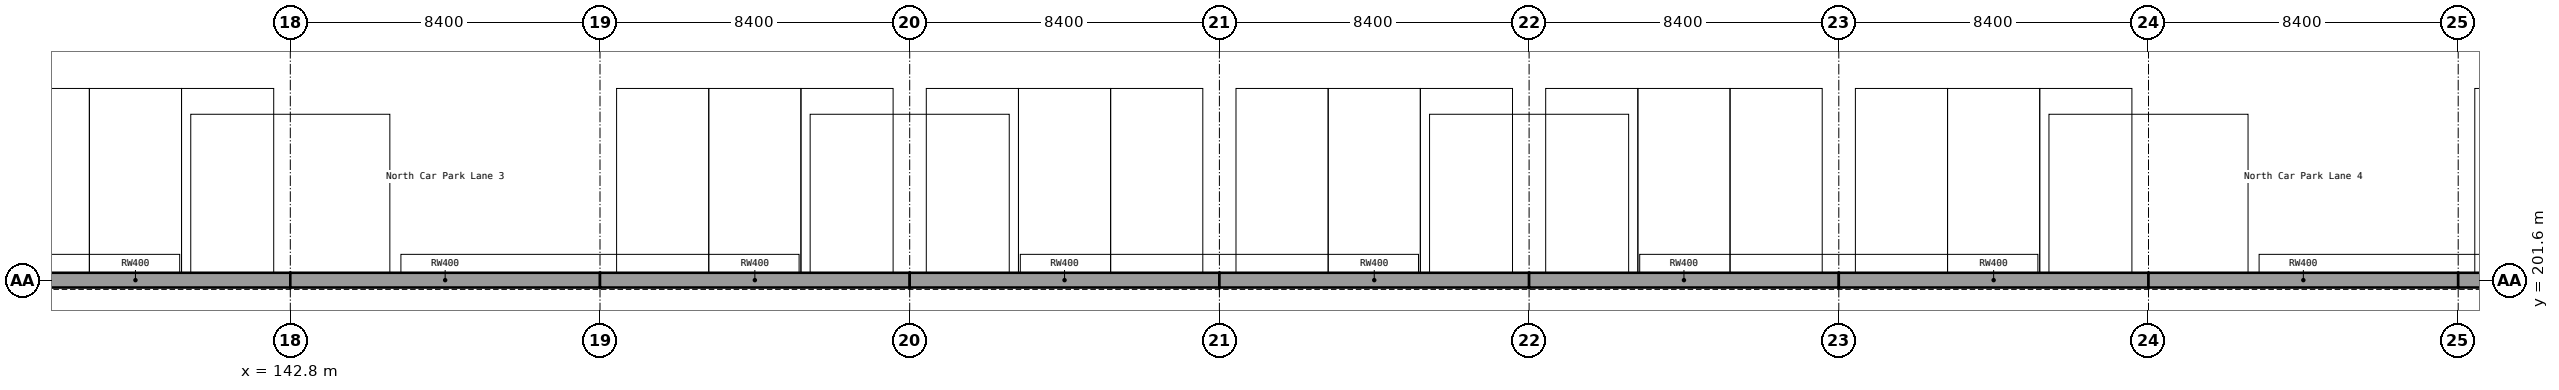
"""IFC4 building model, lengths in metres.
Left out: names, types, materials, properties, quantities, classifications, styles, units other than length and angle.
Written with IfcOpenShell. Run it as: python <this file> out.ifc"""

import sys

from ifc_helpers import new_model, si_unit, direction, frame, frame_2d, origin, place, context, subcontext, project, spatial, rectangle, extrude, element, save


model = new_model("IFC4")
c1 = context("Model", 3, precision=1e-05, world=origin(), true_north=direction((0.0, 1.0)))
c2 = subcontext(c1, "Body", "Model", "MODEL_VIEW")
j1 = project(units=[si_unit("LENGTHUNIT", "METRE"), si_unit("PLANEANGLEUNIT", "RADIAN")], contexts=[c1])
p1 = place(None, origin())
s1 = spatial("IfcSite", under=j1, at=p1, CompositionType="ELEMENT")
p2 = place(p1, origin())
s2 = spatial("IfcBuilding", under=s1, at=p2, CompositionType="ELEMENT")
p3 = place(p2, frame((0.0, 0.0, -3.0)))
s3 = spatial("IfcBuildingStorey", under=s2, at=p3, CompositionType="ELEMENT", Elevation=-3.0)
p4 = place(p3, frame((134.4, 201.6, 0.0), z_axis=(0.0, 0.0, 1.0), x_axis=(1.0, 0.0, 0.0)))
e1 = element("IfcWall", 1, at=p4, inside=s3, PredefinedType="SOLIDWALL", context=c2, shape_type="SweptSolid", body=[
    extrude(rectangle(XDim=8.4, YDim=0.4, at=frame_2d((4.2, 0.0))), origin(), (0.0, 0.0, 1.0), 3.0),
])
p5 = place(p3, frame((142.8, 201.6, 0.0), z_axis=(0.0, 0.0, 1.0), x_axis=(1.0, 0.0, 0.0)))
e2 = element("IfcWall", 2, at=p5, inside=s3, PredefinedType="SOLIDWALL", context=c2, shape_type="SweptSolid", body=[
    extrude(rectangle(XDim=8.4, YDim=0.4, at=frame_2d((4.2, 0.0))), origin(), (0.0, 0.0, 1.0), 3.0),
])
p6 = place(p3, frame((151.2, 201.6, 0.0), z_axis=(0.0, 0.0, 1.0), x_axis=(1.0, 0.0, 0.0)))
e3 = element("IfcWall", 3, at=p6, inside=s3, PredefinedType="SOLIDWALL", context=c2, shape_type="SweptSolid", body=[
    extrude(rectangle(XDim=8.4, YDim=0.4, at=frame_2d((4.2, 0.0))), origin(), (0.0, 0.0, 1.0), 3.0),
])
for number, where, z_axis, x_axis in (
    (4, (159.6, 201.6, 0.0), (0.0, 0.0, 1.0), (1.0, 0.0, 0.0)),
    (5, (168.0, 201.6, 0.0), (0.0, 0.0, 1.0), (1.0, 0.0, 0.0)),
):
    element("IfcWall", number, at=place(p3, frame(where, z_axis=z_axis, x_axis=x_axis)), inside=s3, PredefinedType="SOLIDWALL", context=c2, shape_type="SweptSolid", body=[
        extrude(rectangle(XDim=8.4, YDim=0.4, at=frame_2d((4.2, 0.0))), origin(), (0.0, 0.0, 1.0), 3.0),
    ])
p7 = place(p3, frame((176.4, 201.6, 0.0), z_axis=(0.0, 0.0, 1.0), x_axis=(1.0, 0.0, 0.0)))
e6 = element("IfcWall", 6, at=p7, inside=s3, PredefinedType="SOLIDWALL", context=c2, shape_type="SweptSolid", body=[
    extrude(rectangle(XDim=8.4, YDim=0.4, at=frame_2d((4.2, 0.0))), origin(), (0.0, 0.0, 1.0), 3.0),
])
p8 = place(p3, frame((184.8, 201.6, 0.0), z_axis=(0.0, 0.0, 1.0), x_axis=(1.0, 0.0, 0.0)))
e7 = element("IfcWall", 7, at=p8, inside=s3, PredefinedType="SOLIDWALL", context=c2, shape_type="SweptSolid", body=[
    extrude(rectangle(XDim=8.4, YDim=0.4, at=frame_2d((4.2, 0.0))), origin(), (0.0, 0.0, 1.0), 3.0),
])
p9 = place(p3, frame((193.2, 201.6, 0.0), z_axis=(0.0, 0.0, 1.0), x_axis=(1.0, 0.0, 0.0)))
e8 = element("IfcWall", 8, at=p9, inside=s3, PredefinedType="SOLIDWALL", context=c2, shape_type="SweptSolid", body=[
    extrude(rectangle(XDim=8.4, YDim=0.4, at=frame_2d((4.2, 0.0))), origin(), (0.0, 0.0, 1.0), 3.0),
])
p10 = place(p3, frame((201.6, 201.6, 0.0), z_axis=(0.0, 0.0, 1.0), x_axis=(1.0, 0.0, 0.0)))
e9 = element("IfcWall", 9, at=p10, inside=s3, PredefinedType="SOLIDWALL", context=c2, shape_type="SweptSolid", body=[
    extrude(rectangle(XDim=8.4, YDim=0.4, at=frame_2d((4.2, 0.0))), origin(), (0.0, 0.0, 1.0), 3.0),
])
save(model, sys.argv[1])
